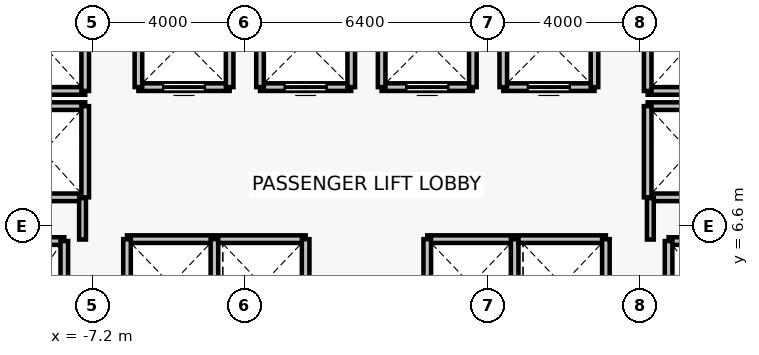
"""IFC4 building model, lengths in metres.
Left out: names, types, materials, properties, quantities, classifications, styles, units other than length and angle.
Written with IfcOpenShell. Run it as: python <this file> out.ifc"""

import sys

from ifc_helpers import new_model, si_unit, direction, frame, frame_2d, origin, place, context, subcontext, project, spatial, rectangle, extrude, source, transform, mapped, element, fill, save


model = new_model("IFC4")
c1 = context("Model", 3, precision=1e-05, world=origin(), true_north=direction((0.0, 1.0)))
c2 = subcontext(c1, "Body", "Model", "MODEL_VIEW")
j1 = project(units=[si_unit("LENGTHUNIT", "METRE"), si_unit("PLANEANGLEUNIT", "RADIAN")], contexts=[c1])
p1 = place(None, origin())
s1 = spatial("IfcSite", under=j1, at=p1, CompositionType="ELEMENT")
p2 = place(p1, origin())
s2 = spatial("IfcBuilding", under=s1, at=p2, CompositionType="ELEMENT")
p3 = place(p2, frame((0.0, 0.0, 5.0)))
s3 = spatial("IfcBuildingStorey", under=s2, at=p3, CompositionType="ELEMENT", Elevation=5.0)
p4 = place(p3, frame((-9.95, 6.2, 0.0), z_axis=(0.0, 0.0, 1.0), x_axis=(1.0, 0.0, 0.0)))
e1 = element("IfcWall", 1, at=p4, inside=s3, PredefinedType="SOLIDWALL", context=c2, shape_type="SweptSolid", body=[
    extrude(rectangle(XDim=2.0, YDim=0.2, at=frame_2d((1.0, 0.0))), origin(), (0.0, 0.0, 1.0), 4.1),
])
p5 = place(p3, frame((-7.95, 6.2, 0.0), z_axis=(0.0, 0.0, 1.0), x_axis=(0.0, -1.0, 0.0)))
e2 = element("IfcWall", 2, at=p5, inside=s3, PredefinedType="SOLIDWALL", context=c2, shape_type="SweptSolid", body=[
    extrude(rectangle(XDim=2.8, YDim=0.2, at=frame_2d((1.4, 0.0))), origin(), (0.0, 0.0, 1.0), 4.1),
])
p6 = place(p3, frame((7.95, 6.2, 0.0), z_axis=(0.0, 0.0, 1.0), x_axis=(1.0, 0.0, 0.0)))
e3 = element("IfcWall", 3, at=p6, inside=s3, PredefinedType="SOLIDWALL", context=c2, shape_type="SweptSolid", body=[
    extrude(rectangle(XDim=2.0, YDim=0.2, at=frame_2d((1.0, 0.0))), origin(), (0.0, 0.0, 1.0), 4.1),
])
p7 = place(p3, frame((7.95, 3.4, 0.0), z_axis=(0.0, 0.0, 1.0), x_axis=(0.0, 1.0, 0.0)))
e4 = element("IfcWall", 4, at=p7, inside=s3, PredefinedType="SOLIDWALL", context=c2, shape_type="SweptSolid", body=[
    extrude(rectangle(XDim=2.8, YDim=0.2, at=frame_2d((1.4, 0.0))), origin(), (0.0, 0.0, 1.0), 4.1),
])
p8 = place(p3, frame((-3.6, 10.25, 0.0), z_axis=(0.0, 0.0, 1.0), x_axis=(-1.0, 0.0, 0.0)))
e5 = element("IfcWall", 5, at=p8, inside=s3, PredefinedType="SOLIDWALL", context=c2, shape_type="SweptSolid", body=[
    extrude(rectangle(XDim=2.4, YDim=0.2, at=frame_2d((1.2, 0.0))), origin(), (0.0, 0.0, 1.0), 4.1),
])
p9 = place(p8, frame((0.65, 0.0, 0.0)))
e6 = element("IfcOpeningElement", 6, at=p9, cuts=e5, PredefinedType="OPENING", context=c2, shape_type="SweptSolid", body=[
    extrude(rectangle(XDim=1.1, YDim=2.2, at=frame_2d((0.55, 1.1))), frame((0.0, 0.11, 0.0), z_axis=(0.0, -1.0, 0.0), x_axis=(1.0, 0.0, 0.0)), (0.0, 0.0, 1.0), 0.22),
])
for number, where, z_axis, x_axis in (
    (7, (-6.0, 10.25, 0.0), (0.0, 0.0, 1.0), (0.0, 1.0, 0.0)),
    (8, (-3.6, 12.65, 0.0), (0.0, 0.0, 1.0), (0.0, -1.0, 0.0)),
):
    element("IfcWall", number, at=place(p3, frame(where, z_axis=z_axis, x_axis=x_axis)), inside=s3, PredefinedType="SOLIDWALL", context=c2, shape_type="SweptSolid", body=[
        extrude(rectangle(XDim=2.4, YDim=0.2, at=frame_2d((1.2, 0.0))), origin(), (0.0, 0.0, 1.0), 4.1),
    ])
p10 = place(p3, frame((-0.4, 10.25, 0.0), z_axis=(0.0, 0.0, 1.0), x_axis=(-1.0, 0.0, 0.0)))
e9 = element("IfcWall", 9, at=p10, inside=s3, PredefinedType="SOLIDWALL", context=c2, shape_type="SweptSolid", body=[
    extrude(rectangle(XDim=2.4, YDim=0.2, at=frame_2d((1.2, 0.0))), origin(), (0.0, 0.0, 1.0), 4.1),
])
p11 = place(p10, frame((0.65, 0.0, 0.0)))
e10 = element("IfcOpeningElement", 10, at=p11, cuts=e9, PredefinedType="OPENING", context=c2, shape_type="SweptSolid", body=[
    extrude(rectangle(XDim=1.1, YDim=2.2, at=frame_2d((0.55, 1.1))), frame((0.0, 0.11, 0.0), z_axis=(0.0, -1.0, 0.0), x_axis=(1.0, 0.0, 0.0)), (0.0, 0.0, 1.0), 0.22),
])
for number, where, z_axis, x_axis in (
    (11, (-2.8, 10.25, 0.0), (0.0, 0.0, 1.0), (0.0, 1.0, 0.0)),
    (12, (-0.4, 12.65, 0.0), (0.0, 0.0, 1.0), (0.0, -1.0, 0.0)),
):
    element("IfcWall", number, at=place(p3, frame(where, z_axis=z_axis, x_axis=x_axis)), inside=s3, PredefinedType="SOLIDWALL", context=c2, shape_type="SweptSolid", body=[
        extrude(rectangle(XDim=2.4, YDim=0.2, at=frame_2d((1.2, 0.0))), origin(), (0.0, 0.0, 1.0), 4.1),
    ])
p12 = place(p3, frame((2.8, 10.25, 0.0), z_axis=(0.0, 0.0, 1.0), x_axis=(-1.0, 0.0, 0.0)))
e13 = element("IfcWall", 13, at=p12, inside=s3, PredefinedType="SOLIDWALL", context=c2, shape_type="SweptSolid", body=[
    extrude(rectangle(XDim=2.4, YDim=0.2, at=frame_2d((1.2, 0.0))), origin(), (0.0, 0.0, 1.0), 4.1),
])
p13 = place(p12, frame((0.65, 0.0, 0.0)))
e14 = element("IfcOpeningElement", 14, at=p13, cuts=e13, PredefinedType="OPENING", context=c2, shape_type="SweptSolid", body=[
    extrude(rectangle(XDim=1.1, YDim=2.2, at=frame_2d((0.55, 1.1))), frame((0.0, 0.11, 0.0), z_axis=(0.0, -1.0, 0.0), x_axis=(1.0, 0.0, 0.0)), (0.0, 0.0, 1.0), 0.22),
])
for number, where, z_axis, x_axis in (
    (15, (0.4, 10.25, 0.0), (0.0, 0.0, 1.0), (0.0, 1.0, 0.0)),
    (16, (2.8, 12.65, 0.0), (0.0, 0.0, 1.0), (0.0, -1.0, 0.0)),
):
    element("IfcWall", number, at=place(p3, frame(where, z_axis=z_axis, x_axis=x_axis)), inside=s3, PredefinedType="SOLIDWALL", context=c2, shape_type="SweptSolid", body=[
        extrude(rectangle(XDim=2.4, YDim=0.2, at=frame_2d((1.2, 0.0))), origin(), (0.0, 0.0, 1.0), 4.1),
    ])
p14 = place(p3, frame((6.0, 10.25, 0.0), z_axis=(0.0, 0.0, 1.0), x_axis=(-1.0, 0.0, 0.0)))
e17 = element("IfcWall", 17, at=p14, inside=s3, PredefinedType="SOLIDWALL", context=c2, shape_type="SweptSolid", body=[
    extrude(rectangle(XDim=2.4, YDim=0.2, at=frame_2d((1.2, 0.0))), origin(), (0.0, 0.0, 1.0), 4.1),
])
p15 = place(p14, frame((0.65, 0.0, 0.0)))
e18 = element("IfcOpeningElement", 18, at=p15, cuts=e17, PredefinedType="OPENING", context=c2, shape_type="SweptSolid", body=[
    extrude(rectangle(XDim=1.1, YDim=2.2, at=frame_2d((0.55, 1.1))), frame((0.0, 0.11, 0.0), z_axis=(0.0, -1.0, 0.0), x_axis=(1.0, 0.0, 0.0)), (0.0, 0.0, 1.0), 0.22),
])
for number, where, z_axis, x_axis in (
    (19, (3.6, 10.25, 0.0), (0.0, 0.0, 1.0), (0.0, 1.0, 0.0)),
    (20, (6.0, 12.65, 0.0), (0.0, 0.0, 1.0), (0.0, -1.0, 0.0)),
):
    element("IfcWall", number, at=place(p3, frame(where, z_axis=z_axis, x_axis=x_axis)), inside=s3, PredefinedType="SOLIDWALL", context=c2, shape_type="SweptSolid", body=[
        extrude(rectangle(XDim=2.4, YDim=0.2, at=frame_2d((1.2, 0.0))), origin(), (0.0, 0.0, 1.0), 4.1),
    ])
p16 = place(p3, frame((-6.3, 6.25, 0.0), z_axis=(0.0, 0.0, 1.0), x_axis=(1.0, 0.0, 0.0)))
e21 = element("IfcWall", 21, at=p16, inside=s3, PredefinedType="SOLIDWALL", context=c2, shape_type="SweptSolid", body=[
    extrude(rectangle(XDim=2.3, YDim=0.2, at=frame_2d((1.15, 0.0))), origin(), (0.0, 0.0, 1.0), 4.1),
])
for number, where, z_axis, x_axis in (
    (22, (-6.3, 3.85, 0.0), (0.0, 0.0, 1.0), (0.0, 1.0, 0.0)),
    (23, (-4.0, 6.25, 0.0), (0.0, 0.0, 1.0), (0.0, -1.0, 0.0)),
):
    element("IfcWall", number, at=place(p3, frame(where, z_axis=z_axis, x_axis=x_axis)), inside=s3, PredefinedType="SOLIDWALL", context=c2, shape_type="SweptSolid", body=[
        extrude(rectangle(XDim=2.4, YDim=0.2, at=frame_2d((1.2, 0.0))), origin(), (0.0, 0.0, 1.0), 4.1),
    ])
p17 = place(p3, frame((-3.9, 6.25, 0.0), z_axis=(0.0, 0.0, 1.0), x_axis=(1.0, 0.0, 0.0)))
e24 = element("IfcWall", 24, at=p17, inside=s3, PredefinedType="SOLIDWALL", context=c2, shape_type="SweptSolid", body=[
    extrude(rectangle(XDim=2.3, YDim=0.2, at=frame_2d((1.15, 0.0))), origin(), (0.0, 0.0, 1.0), 4.1),
])
p18 = place(p3, frame((-1.6, 6.25, 0.0), z_axis=(0.0, 0.0, 1.0), x_axis=(0.0, -1.0, 0.0)))
e25 = element("IfcWall", 25, at=p18, inside=s3, PredefinedType="SOLIDWALL", context=c2, shape_type="SweptSolid", body=[
    extrude(rectangle(XDim=2.4, YDim=0.2, at=frame_2d((1.2, 0.0))), origin(), (0.0, 0.0, 1.0), 4.1),
])
p19 = place(p3, frame((1.6, 6.25, 0.0), z_axis=(0.0, 0.0, 1.0), x_axis=(1.0, 0.0, 0.0)))
e26 = element("IfcWall", 26, at=p19, inside=s3, PredefinedType="SOLIDWALL", context=c2, shape_type="SweptSolid", body=[
    extrude(rectangle(XDim=2.3, YDim=0.2, at=frame_2d((1.15, 0.0))), origin(), (0.0, 0.0, 1.0), 4.1),
])
for number, where, z_axis, x_axis in (
    (27, (1.6, 3.85, 0.0), (0.0, 0.0, 1.0), (0.0, 1.0, 0.0)),
    (28, (3.9, 6.25, 0.0), (0.0, 0.0, 1.0), (0.0, -1.0, 0.0)),
):
    element("IfcWall", number, at=place(p3, frame(where, z_axis=z_axis, x_axis=x_axis)), inside=s3, PredefinedType="SOLIDWALL", context=c2, shape_type="SweptSolid", body=[
        extrude(rectangle(XDim=2.4, YDim=0.2, at=frame_2d((1.2, 0.0))), origin(), (0.0, 0.0, 1.0), 4.1),
    ])
p20 = place(p3, frame((4.0, 6.25, 0.0), z_axis=(0.0, 0.0, 1.0), x_axis=(1.0, 0.0, 0.0)))
e29 = element("IfcWall", 29, at=p20, inside=s3, PredefinedType="SOLIDWALL", context=c2, shape_type="SweptSolid", body=[
    extrude(rectangle(XDim=2.3, YDim=0.2, at=frame_2d((1.15, 0.0))), origin(), (0.0, 0.0, 1.0), 4.1),
])
p21 = place(p3, frame((6.3, 6.25, 0.0), z_axis=(0.0, 0.0, 1.0), x_axis=(0.0, -1.0, 0.0)))
e30 = element("IfcWall", 30, at=p21, inside=s3, PredefinedType="SOLIDWALL", context=c2, shape_type="SweptSolid", body=[
    extrude(rectangle(XDim=2.4, YDim=0.2, at=frame_2d((1.2, 0.0))), origin(), (0.0, 0.0, 1.0), 4.1),
])
for number, where, z_axis, x_axis in (
    (31, (-7.4, 7.35, 0.0), (0.0, 0.0, 1.0), (-1.0, 0.0, 0.0)),
    (32, (-9.6, 9.75, 0.0), (0.0, 0.0, 1.0), (1.0, 0.0, 0.0)),
):
    element("IfcWall", number, at=place(p3, frame(where, z_axis=z_axis, x_axis=x_axis)), inside=s3, PredefinedType="SOLIDWALL", context=c2, shape_type="SweptSolid", body=[
        extrude(rectangle(XDim=2.2, YDim=0.2, at=frame_2d((1.1, 0.0))), origin(), (0.0, 0.0, 1.0), 3.19),
    ])
p22 = place(p3, frame((-7.4, 9.75, 0.0), z_axis=(0.0, 0.0, 1.0), x_axis=(0.0, -1.0, 0.0)))
e33 = element("IfcWall", 33, at=p22, inside=s3, PredefinedType="SOLIDWALL", context=c2, shape_type="SweptSolid", body=[
    extrude(rectangle(XDim=2.4, YDim=0.2, at=frame_2d((1.2, 0.0))), origin(), (0.0, 0.0, 1.0), 3.19),
])
p23 = place(p3, frame((-7.4, 10.15, 0.0), z_axis=(0.0, 0.0, 1.0), x_axis=(-1.0, 0.0, 0.0)))
e34 = element("IfcWall", 34, at=p23, inside=s3, PredefinedType="SOLIDWALL", context=c2, shape_type="SweptSolid", body=[
    extrude(rectangle(XDim=2.2, YDim=0.2, at=frame_2d((1.1, 0.0))), origin(), (0.0, 0.0, 1.0), 3.19),
])
p24 = place(p3, frame((-7.4, 12.55, 0.0), z_axis=(0.0, 0.0, 1.0), x_axis=(0.0, -1.0, 0.0)))
e35 = element("IfcWall", 35, at=p24, inside=s3, PredefinedType="SOLIDWALL", context=c2, shape_type="SweptSolid", body=[
    extrude(rectangle(XDim=2.4, YDim=0.2, at=frame_2d((1.2, 0.0))), origin(), (0.0, 0.0, 1.0), 3.19),
])
for number, where, z_axis, x_axis in (
    (36, (9.6, 7.35, 0.0), (0.0, 0.0, 1.0), (-1.0, 0.0, 0.0)),
    (37, (7.4, 9.75, 0.0), (0.0, 0.0, 1.0), (1.0, 0.0, 0.0)),
):
    element("IfcWall", number, at=place(p3, frame(where, z_axis=z_axis, x_axis=x_axis)), inside=s3, PredefinedType="SOLIDWALL", context=c2, shape_type="SweptSolid", body=[
        extrude(rectangle(XDim=2.2, YDim=0.2, at=frame_2d((1.1, 0.0))), origin(), (0.0, 0.0, 1.0), 3.19),
    ])
p25 = place(p3, frame((7.4, 7.35, 0.0), z_axis=(0.0, 0.0, 1.0), x_axis=(0.0, 1.0, 0.0)))
e38 = element("IfcWall", 38, at=p25, inside=s3, PredefinedType="SOLIDWALL", context=c2, shape_type="SweptSolid", body=[
    extrude(rectangle(XDim=2.4, YDim=0.2, at=frame_2d((1.2, 0.0))), origin(), (0.0, 0.0, 1.0), 3.19),
])
p26 = place(p3, frame((9.6, 10.15, 0.0), z_axis=(0.0, 0.0, 1.0), x_axis=(-1.0, 0.0, 0.0)))
e39 = element("IfcWall", 39, at=p26, inside=s3, PredefinedType="SOLIDWALL", context=c2, shape_type="SweptSolid", body=[
    extrude(rectangle(XDim=2.2, YDim=0.2, at=frame_2d((1.1, 0.0))), origin(), (0.0, 0.0, 1.0), 3.19),
])
p27 = place(p3, frame((7.4, 10.15, 0.0), z_axis=(0.0, 0.0, 1.0), x_axis=(0.0, 1.0, 0.0)))
e40 = element("IfcWall", 40, at=p27, inside=s3, PredefinedType="SOLIDWALL", context=c2, shape_type="SweptSolid", body=[
    extrude(rectangle(XDim=2.4, YDim=0.2, at=frame_2d((1.2, 0.0))), origin(), (0.0, 0.0, 1.0), 3.19),
])
for number, where, z_axis, x_axis in (
    (41, (-7.47, 7.33, 0.0), (0.0, 0.0, 1.0), (0.0, -1.0, 0.0)),
    (42, (7.47, 6.24, 0.0), (0.0, 0.0, 1.0), (0.0, 1.0, 0.0)),
):
    element("IfcWall", number, at=place(p3, frame(where, z_axis=z_axis, x_axis=x_axis)), inside=s3, PredefinedType="PARTITIONING", context=c2, shape_type="SweptSolid", body=[
        extrude(rectangle(XDim=1.09, YDim=0.18, at=frame_2d((0.545, 0.0))), origin(), (0.0, 0.0, 1.0), 3.19),
    ])
m1 = source(origin(), c2, "Body", "SweptSolid", [
    extrude(rectangle(XDim=1.1, YDim=2.2, at=frame_2d((0.55, 1.1))), frame((0.0, 0.025, 0.0), z_axis=(0.0, -1.0, 0.0), x_axis=(1.0, 0.0, 0.0)), (0.0, 0.0, 1.0), 0.05),
])
p28 = place(p9, origin())
e43 = element("IfcDoor", 43, at=p28, inside=s3, OperationType="DOUBLE_DOOR_SLIDING", PredefinedType="DOOR", context=c2, shape_type="MappedRepresentation", body=[
    mapped(m1, transform((0.0, 0.0, 0.0), x_axis=(1.0, 0.0, 0.0), y_axis=(0.0, 1.0, 0.0), z_axis=(0.0, 0.0, 1.0), scale=1.0)),
])
fill(e6, e43)
p29 = place(p11, origin())
e44 = element("IfcDoor", 44, at=p29, inside=s3, OperationType="DOUBLE_DOOR_SLIDING", PredefinedType="DOOR", context=c2, shape_type="MappedRepresentation", body=[
    mapped(m1, transform((0.0, 0.0, 0.0), x_axis=(1.0, 0.0, 0.0), y_axis=(0.0, 1.0, 0.0), z_axis=(0.0, 0.0, 1.0), scale=1.0)),
])
fill(e10, e44)
p30 = place(p13, origin())
e45 = element("IfcDoor", 45, at=p30, inside=s3, OperationType="DOUBLE_DOOR_SLIDING", PredefinedType="DOOR", context=c2, shape_type="MappedRepresentation", body=[
    mapped(m1, transform((0.0, 0.0, 0.0), x_axis=(1.0, 0.0, 0.0), y_axis=(0.0, 1.0, 0.0), z_axis=(0.0, 0.0, 1.0), scale=1.0)),
])
fill(e14, e45)
p31 = place(p15, origin())
e46 = element("IfcDoor", 46, at=p31, inside=s3, OperationType="DOUBLE_DOOR_SLIDING", PredefinedType="DOOR", context=c2, shape_type="MappedRepresentation", body=[
    mapped(m1, transform((0.0, 0.0, 0.0), x_axis=(1.0, 0.0, 0.0), y_axis=(0.0, 1.0, 0.0), z_axis=(0.0, 0.0, 1.0), scale=1.0)),
])
fill(e18, e46)
save(model, sys.argv[1])
